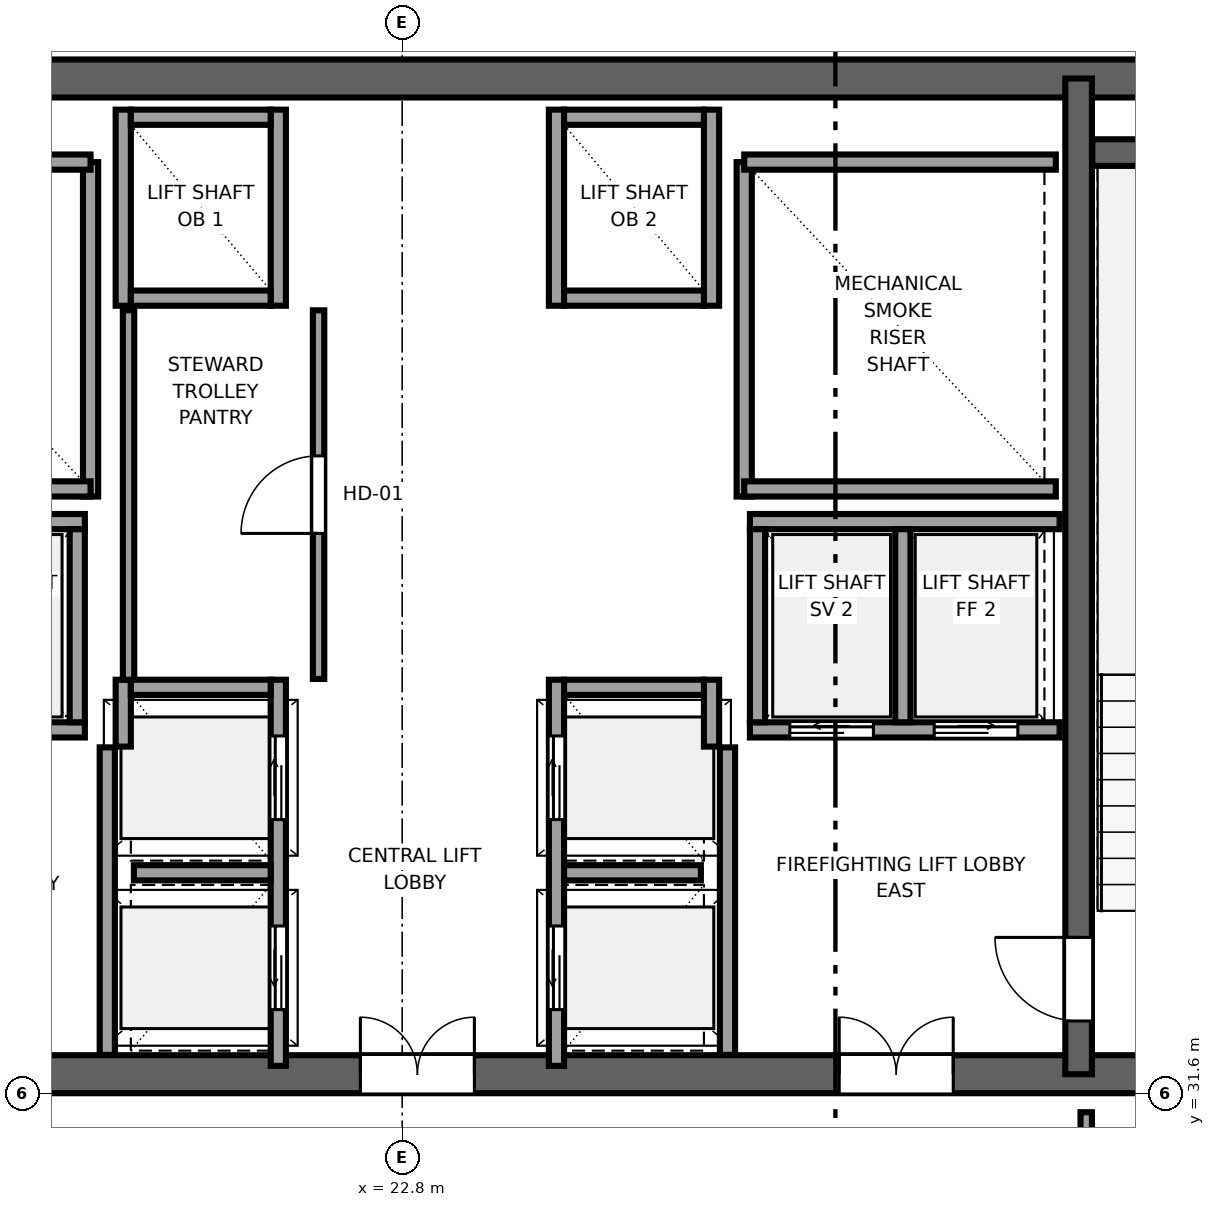
"""IFC4 building model, lengths in metres.
Left out: names, types, materials, properties, quantities, classifications, styles, units other than length and angle.
Written with IfcOpenShell. Run it as: python <this file> out.ifc"""

import sys

from ifc_helpers import new_model, si_unit, direction, frame, frame_2d, origin, place, context, subcontext, project, spatial, rectangle, extrude, source, transform, mapped, element, fill, save


model = new_model("IFC4")
c1 = context("Model", 3, precision=1e-05, world=origin(), true_north=direction((0.0, 1.0)))
c2 = subcontext(c1, "Body", "Model", "MODEL_VIEW")
j1 = project(units=[si_unit("LENGTHUNIT", "METRE"), si_unit("PLANEANGLEUNIT", "RADIAN")], contexts=[c1])
p1 = place(None, origin())
s1 = spatial("IfcSite", under=j1, at=p1, CompositionType="ELEMENT")
p2 = place(p1, origin())
s2 = spatial("IfcBuilding", under=s1, at=p2, CompositionType="ELEMENT")
p3 = place(p2, frame((0.0, 0.0, 275.05)))
s3 = spatial("IfcBuildingStorey", under=s2, at=p3, CompositionType="ELEMENT", Elevation=275.05)
p4 = place(p3, frame((10.0, 31.85, 0.0), z_axis=(0.0, 0.0, 1.0), x_axis=(1.0, 0.0, 0.0)))
e1 = element("IfcWall", 1, at=p4, inside=s3, PredefinedType="SHEAR", context=c2, shape_type="SweptSolid", body=[
    extrude(rectangle(XDim=26.0, YDim=0.5, at=frame_2d((13.0, 0.0))), origin(), (0.0, 0.0, 1.0), 3.55),
])
p5 = place(p4, frame((7.45, 0.0, 0.0), z_axis=(0.0, 0.0, 1.0), x_axis=(-1.0, 0.0, 0.0)))
e2 = element("IfcOpeningElement", 2, at=p5, cuts=e1, PredefinedType="OPENING", context=c2, shape_type="SweptSolid", body=[
    extrude(rectangle(XDim=1.5, YDim=2.04, at=frame_2d((0.75, 1.02))), frame((0.0, 0.26, 0.0), z_axis=(0.0, -1.0, 0.0), x_axis=(1.0, 0.0, 0.0)), (0.0, 0.0, 1.0), 0.52),
])
p6 = place(p4, frame((13.75, 0.0, 0.0), z_axis=(0.0, 0.0, 1.0), x_axis=(-1.0, 0.0, 0.0)))
e3 = element("IfcOpeningElement", 3, at=p6, cuts=e1, PredefinedType="OPENING", context=c2, shape_type="SweptSolid", body=[
    extrude(rectangle(XDim=1.5, YDim=2.04, at=frame_2d((0.75, 1.02))), frame((0.0, 0.26, 0.0), z_axis=(0.0, -1.0, 0.0), x_axis=(1.0, 0.0, 0.0)), (0.0, 0.0, 1.0), 0.52),
])
p7 = place(p4, frame((20.05, 0.0, 0.0), z_axis=(0.0, 0.0, 1.0), x_axis=(-1.0, 0.0, 0.0)))
e4 = element("IfcOpeningElement", 4, at=p7, cuts=e1, PredefinedType="OPENING", context=c2, shape_type="SweptSolid", body=[
    extrude(rectangle(XDim=1.5, YDim=2.04, at=frame_2d((0.75, 1.02))), frame((0.0, 0.26, 0.0), z_axis=(0.0, -1.0, 0.0), x_axis=(1.0, 0.0, 0.0)), (0.0, 0.0, 1.0), 0.52),
])
p8 = place(p3, frame((10.0, 44.95, 0.0), z_axis=(0.0, 0.0, 1.0), x_axis=(1.0, 0.0, 0.0)))
e5 = element("IfcWall", 5, at=p8, inside=s3, PredefinedType="SHEAR", context=c2, shape_type="SweptSolid", body=[
    extrude(rectangle(XDim=26.0, YDim=0.5, at=frame_2d((13.0, 0.0))), origin(), (0.0, 0.0, 1.0), 3.55),
])
p9 = place(p3, frame((31.7, 31.85, 0.0), z_axis=(0.0, 0.0, 1.0), x_axis=(0.0, 1.0, 0.0)))
e6 = element("IfcWall", 6, at=p9, inside=s3, PredefinedType="SHEAR", context=c2, shape_type="SweptSolid", body=[
    extrude(rectangle(XDim=13.1, YDim=0.35, at=frame_2d((6.55, 0.0))), origin(), (0.0, 0.0, 1.0), 3.55),
])
p10 = place(p9, frame((1.8, 0.0, 0.0), z_axis=(0.0, 0.0, 1.0), x_axis=(-1.0, 0.0, 0.0)))
e7 = element("IfcOpeningElement", 7, at=p10, cuts=e6, PredefinedType="OPENING", context=c2, shape_type="SweptSolid", body=[
    extrude(rectangle(XDim=1.1, YDim=2.12, at=frame_2d((0.55, 1.06))), frame((0.0, 0.185, 0.0), z_axis=(0.0, -1.0, 0.0), x_axis=(1.0, 0.0, 0.0)), (0.0, 0.0, 1.0), 0.37),
])
p11 = place(p3, frame((31.88, 43.975, 0.0), z_axis=(0.0, 0.0, 1.0), x_axis=(1.0, 0.0, 0.0)))
e8 = element("IfcWall", 8, at=p11, inside=s3, PredefinedType="SHEAR", context=c2, shape_type="SweptSolid", body=[
    extrude(rectangle(XDim=3.6, YDim=0.35, at=frame_2d((1.8, 0.0))), origin(), (0.0, 0.0, 1.0), 3.55),
])
p12 = place(p3, frame((18.7, 39.45, 0.0), z_axis=(0.0, 0.0, 1.0), x_axis=(0.0, 1.0, 0.0)))
e9 = element("IfcWall", 9, at=p12, inside=s3, PredefinedType="SOLIDWALL", context=c2, shape_type="SweptSolid", body=[
    extrude(rectangle(XDim=4.4, YDim=0.2, at=frame_2d((2.2, 0.0))), origin(), (0.0, 0.0, 1.0), 3.33),
])
for number, where, z_axis, x_axis in (
    (10, (14.6, 39.55, 0.0), (0.0, 0.0, 1.0), (1.0, 0.0, 0.0)),
    (11, (14.6, 43.85, 0.0), (0.0, 0.0, 1.0), (1.0, 0.0, 0.0)),
):
    element("IfcWall", number, at=place(p3, frame(where, z_axis=z_axis, x_axis=x_axis)), inside=s3, PredefinedType="SOLIDWALL", context=c2, shape_type="SweptSolid", body=[
        extrude(rectangle(XDim=4.1, YDim=0.2, at=frame_2d((2.05, 0.0))), origin(), (0.0, 0.0, 1.0), 3.33),
    ])
p13 = place(p3, frame((27.3, 39.45, 0.0), z_axis=(0.0, 0.0, 1.0), x_axis=(0.0, 1.0, 0.0)))
e12 = element("IfcWall", 12, at=p13, inside=s3, PredefinedType="SOLIDWALL", context=c2, shape_type="SweptSolid", body=[
    extrude(rectangle(XDim=4.4, YDim=0.2, at=frame_2d((2.2, 0.0))), origin(), (0.0, 0.0, 1.0), 3.33),
])
for number, where, z_axis, x_axis in (
    (13, (27.3, 39.55, 0.0), (0.0, 0.0, 1.0), (1.0, 0.0, 0.0)),
    (14, (27.3, 43.85, 0.0), (0.0, 0.0, 1.0), (1.0, 0.0, 0.0)),
):
    element("IfcWall", number, at=place(p3, frame(where, z_axis=z_axis, x_axis=x_axis)), inside=s3, PredefinedType="SOLIDWALL", context=c2, shape_type="SweptSolid", body=[
        extrude(rectangle(XDim=4.1, YDim=0.2, at=frame_2d((2.05, 0.0))), origin(), (0.0, 0.0, 1.0), 3.33),
    ])
for number, where, z_axis, x_axis in (
    (15, (18.92, 32.104, 0.0), (0.0, 0.0, 1.0), (0.0, 1.0, 0.0)),
    (16, (27.08, 32.104, 0.0), (0.0, 0.0, 1.0), (0.0, 1.0, 0.0)),
):
    element("IfcWall", number, at=place(p3, frame(where, z_axis=z_axis, x_axis=x_axis)), inside=s3, PredefinedType="SOLIDWALL", context=c2, shape_type="SweptSolid", body=[
        extrude(rectangle(XDim=4.046, YDim=0.2, at=frame_2d((2.023, 0.0))), origin(), (0.0, 0.0, 1.0), 3.33),
    ])
p14 = place(p3, frame((21.17, 31.96, 0.0), z_axis=(0.0, 0.0, 1.0), x_axis=(0.0, 1.0, 0.0)))
e17 = element("IfcWall", 17, at=p14, inside=s3, PredefinedType="SOLIDWALL", context=c2, shape_type="SweptSolid", body=[
    extrude(rectangle(XDim=5.08, YDim=0.2, at=frame_2d((2.54, 0.0))), origin(), (0.0, 0.0, 1.0), 3.33),
])
p15 = place(p14, frame((0.74, 0.0, 0.0)))
e18 = element("IfcOpeningElement", 18, at=p15, cuts=e17, PredefinedType="OPENING", context=c2, shape_type="SweptSolid", body=[
    extrude(rectangle(XDim=1.1, YDim=2.12, at=frame_2d((0.55, 1.06))), frame((0.0, 0.11, 0.0), z_axis=(0.0, -1.0, 0.0), x_axis=(1.0, 0.0, 0.0)), (0.0, 0.0, 1.0), 0.22),
])
p16 = place(p14, frame((3.24, 0.0, 0.0)))
e19 = element("IfcOpeningElement", 19, at=p16, cuts=e17, PredefinedType="OPENING", context=c2, shape_type="SweptSolid", body=[
    extrude(rectangle(XDim=1.1, YDim=2.12, at=frame_2d((0.55, 1.06))), frame((0.0, 0.11, 0.0), z_axis=(0.0, -1.0, 0.0), x_axis=(1.0, 0.0, 0.0)), (0.0, 0.0, 1.0), 0.22),
])
p17 = place(p3, frame((19.13, 36.16, 0.0), z_axis=(0.0, 0.0, 1.0), x_axis=(0.0, 1.0, 0.0)))
e20 = element("IfcWall", 20, at=p17, inside=s3, PredefinedType="SOLIDWALL", context=c2, shape_type="SweptSolid", body=[
    extrude(rectangle(XDim=0.88, YDim=0.2, at=frame_2d((0.44, 0.0))), origin(), (0.0, 0.0, 1.0), 3.33),
])
p18 = place(p3, frame((19.23, 36.94, 0.0), z_axis=(0.0, 0.0, 1.0), x_axis=(1.0, 0.0, 0.0)))
e21 = element("IfcWall", 21, at=p18, inside=s3, PredefinedType="SOLIDWALL", context=c2, shape_type="SweptSolid", body=[
    extrude(rectangle(XDim=1.84, YDim=0.2, at=frame_2d((0.92, 0.0))), origin(), (0.0, 0.0, 1.0), 3.33),
])
p19 = place(p3, frame((19.27, 34.5, 0.0), z_axis=(0.0, 0.0, 1.0), x_axis=(1.0, 0.0, 0.0)))
e22 = element("IfcWall", 22, at=p19, inside=s3, PredefinedType="SOLIDWALL", context=c2, shape_type="SweptSolid", body=[
    extrude(rectangle(XDim=1.8, YDim=0.2, at=frame_2d((0.9, 0.0))), origin(), (0.0, 0.0, 1.0), 3.33),
])
for number, where, z_axis, x_axis in (
    (23, (21.17, 41.96, 0.0), (0.0, 0.0, 1.0), (0.0, 1.0, 0.0)),
    (24, (19.13, 41.96, 0.0), (0.0, 0.0, 1.0), (0.0, 1.0, 0.0)),
):
    element("IfcWall", number, at=place(p3, frame(where, z_axis=z_axis, x_axis=x_axis)), inside=s3, PredefinedType="SOLIDWALL", context=c2, shape_type="SweptSolid", body=[
        extrude(rectangle(XDim=2.58, YDim=0.2, at=frame_2d((1.29, 0.0))), origin(), (0.0, 0.0, 1.0), 3.33),
    ])
for number, where, z_axis, x_axis in (
    (25, (19.23, 42.06, 0.0), (0.0, 0.0, 1.0), (1.0, 0.0, 0.0)),
    (26, (19.23, 44.44, 0.0), (0.0, 0.0, 1.0), (1.0, 0.0, 0.0)),
):
    element("IfcWall", number, at=place(p3, frame(where, z_axis=z_axis, x_axis=x_axis)), inside=s3, PredefinedType="SOLIDWALL", context=c2, shape_type="SweptSolid", body=[
        extrude(rectangle(XDim=1.84, YDim=0.2, at=frame_2d((0.92, 0.0))), origin(), (0.0, 0.0, 1.0), 3.33),
    ])
p20 = place(p3, frame((27.375, 36.38, 0.0), z_axis=(0.0, 0.0, 1.0), x_axis=(1.0, 0.0, 0.0)))
e27 = element("IfcWall", 27, at=p20, inside=s3, PredefinedType="SOLIDWALL", context=c2, shape_type="SweptSolid", body=[
    extrude(rectangle(XDim=4.075, YDim=0.2, at=frame_2d((2.038, 0.0))), origin(), (0.0, 0.0, 1.0), 3.33),
])
p21 = place(p20, frame((0.525, 0.0, 0.0)))
e28 = element("IfcOpeningElement", 28, at=p21, cuts=e27, PredefinedType="OPENING", context=c2, shape_type="SweptSolid", body=[
    extrude(rectangle(XDim=1.1, YDim=2.12, at=frame_2d((0.55, 1.06))), frame((0.0, 0.11, 0.0), z_axis=(0.0, -1.0, 0.0), x_axis=(1.0, 0.0, 0.0)), (0.0, 0.0, 1.0), 0.22),
])
p22 = place(p20, frame((2.425, 0.0, 0.0)))
e29 = element("IfcOpeningElement", 29, at=p22, cuts=e27, PredefinedType="OPENING", context=c2, shape_type="SweptSolid", body=[
    extrude(rectangle(XDim=1.1, YDim=2.12, at=frame_2d((0.55, 1.06))), frame((0.0, 0.11, 0.0), z_axis=(0.0, -1.0, 0.0), x_axis=(1.0, 0.0, 0.0)), (0.0, 0.0, 1.0), 0.22),
])
p23 = place(p3, frame((27.375, 39.12, 0.0), z_axis=(0.0, 0.0, 1.0), x_axis=(1.0, 0.0, 0.0)))
e30 = element("IfcWall", 30, at=p23, inside=s3, PredefinedType="SOLIDWALL", context=c2, shape_type="SweptSolid", body=[
    extrude(rectangle(XDim=4.075, YDim=0.2, at=frame_2d((2.038, 0.0))), origin(), (0.0, 0.0, 1.0), 3.33),
])
for number, where, z_axis, x_axis in (
    (31, (27.475, 36.48, 0.0), (0.0, 0.0, 1.0), (0.0, 1.0, 0.0)),
    (32, (29.387, 36.48, 0.0), (0.0, 0.0, 1.0), (0.0, 1.0, 0.0)),
):
    element("IfcWall", number, at=place(p3, frame(where, z_axis=z_axis, x_axis=x_axis)), inside=s3, PredefinedType="SOLIDWALL", context=c2, shape_type="SweptSolid", body=[
        extrude(rectangle(XDim=2.54, YDim=0.2, at=frame_2d((1.27, 0.0))), origin(), (0.0, 0.0, 1.0), 3.33),
    ])
p24 = place(p3, frame((14.55, 36.38, 0.0), z_axis=(0.0, 0.0, 1.0), x_axis=(1.0, 0.0, 0.0)))
e33 = element("IfcWall", 33, at=p24, inside=s3, PredefinedType="SOLIDWALL", context=c2, shape_type="SweptSolid", body=[
    extrude(rectangle(XDim=4.075, YDim=0.2, at=frame_2d((2.038, 0.0))), origin(), (0.0, 0.0, 1.0), 3.33),
])
p25 = place(p24, frame((0.55, 0.0, 0.0)))
e34 = element("IfcOpeningElement", 34, at=p25, cuts=e33, PredefinedType="OPENING", context=c2, shape_type="SweptSolid", body=[
    extrude(rectangle(XDim=1.1, YDim=2.12, at=frame_2d((0.55, 1.06))), frame((0.0, 0.11, 0.0), z_axis=(0.0, -1.0, 0.0), x_axis=(1.0, 0.0, 0.0)), (0.0, 0.0, 1.0), 0.22),
])
p26 = place(p24, frame((2.45, 0.0, 0.0)))
e35 = element("IfcOpeningElement", 35, at=p26, cuts=e33, PredefinedType="OPENING", context=c2, shape_type="SweptSolid", body=[
    extrude(rectangle(XDim=1.1, YDim=2.12, at=frame_2d((0.55, 1.06))), frame((0.0, 0.11, 0.0), z_axis=(0.0, -1.0, 0.0), x_axis=(1.0, 0.0, 0.0)), (0.0, 0.0, 1.0), 0.22),
])
p27 = place(p3, frame((14.55, 39.12, 0.0), z_axis=(0.0, 0.0, 1.0), x_axis=(1.0, 0.0, 0.0)))
e36 = element("IfcWall", 36, at=p27, inside=s3, PredefinedType="SOLIDWALL", context=c2, shape_type="SweptSolid", body=[
    extrude(rectangle(XDim=4.075, YDim=0.2, at=frame_2d((2.038, 0.0))), origin(), (0.0, 0.0, 1.0), 3.33),
])
p28 = place(p3, frame((18.525, 36.48, 0.0), z_axis=(0.0, 0.0, 1.0), x_axis=(0.0, 1.0, 0.0)))
e37 = element("IfcWall", 37, at=p28, inside=s3, PredefinedType="SOLIDWALL", context=c2, shape_type="SweptSolid", body=[
    extrude(rectangle(XDim=2.54, YDim=0.2, at=frame_2d((1.27, 0.0))), origin(), (0.0, 0.0, 1.0), 3.33),
])
p29 = place(p3, frame((24.83, 31.96, 0.0), z_axis=(0.0, 0.0, 1.0), x_axis=(0.0, 1.0, 0.0)))
e38 = element("IfcWall", 38, at=p29, inside=s3, PredefinedType="SOLIDWALL", context=c2, shape_type="SweptSolid", body=[
    extrude(rectangle(XDim=5.08, YDim=0.2, at=frame_2d((2.54, 0.0))), origin(), (0.0, 0.0, 1.0), 3.33),
])
p30 = place(p29, frame((0.74, 0.0, 0.0)))
e39 = element("IfcOpeningElement", 39, at=p30, cuts=e38, PredefinedType="OPENING", context=c2, shape_type="SweptSolid", body=[
    extrude(rectangle(XDim=1.1, YDim=2.12, at=frame_2d((0.55, 1.06))), frame((0.0, 0.11, 0.0), z_axis=(0.0, -1.0, 0.0), x_axis=(1.0, 0.0, 0.0)), (0.0, 0.0, 1.0), 0.22),
])
p31 = place(p29, frame((3.24, 0.0, 0.0)))
e40 = element("IfcOpeningElement", 40, at=p31, cuts=e38, PredefinedType="OPENING", context=c2, shape_type="SweptSolid", body=[
    extrude(rectangle(XDim=1.1, YDim=2.12, at=frame_2d((0.55, 1.06))), frame((0.0, 0.11, 0.0), z_axis=(0.0, -1.0, 0.0), x_axis=(1.0, 0.0, 0.0)), (0.0, 0.0, 1.0), 0.22),
])
p32 = place(p3, frame((26.87, 36.16, 0.0), z_axis=(0.0, 0.0, 1.0), x_axis=(0.0, 1.0, 0.0)))
e41 = element("IfcWall", 41, at=p32, inside=s3, PredefinedType="SOLIDWALL", context=c2, shape_type="SweptSolid", body=[
    extrude(rectangle(XDim=0.88, YDim=0.2, at=frame_2d((0.44, 0.0))), origin(), (0.0, 0.0, 1.0), 3.33),
])
p33 = place(p3, frame((24.93, 36.94, 0.0), z_axis=(0.0, 0.0, 1.0), x_axis=(1.0, 0.0, 0.0)))
e42 = element("IfcWall", 42, at=p33, inside=s3, PredefinedType="SOLIDWALL", context=c2, shape_type="SweptSolid", body=[
    extrude(rectangle(XDim=1.84, YDim=0.2, at=frame_2d((0.92, 0.0))), origin(), (0.0, 0.0, 1.0), 3.33),
])
p34 = place(p3, frame((24.93, 34.5, 0.0), z_axis=(0.0, 0.0, 1.0), x_axis=(1.0, 0.0, 0.0)))
e43 = element("IfcWall", 43, at=p34, inside=s3, PredefinedType="SOLIDWALL", context=c2, shape_type="SweptSolid", body=[
    extrude(rectangle(XDim=1.8, YDim=0.2, at=frame_2d((0.9, 0.0))), origin(), (0.0, 0.0, 1.0), 3.33),
])
for number, where, z_axis, x_axis in (
    (44, (24.83, 41.96, 0.0), (0.0, 0.0, 1.0), (0.0, 1.0, 0.0)),
    (45, (26.87, 41.96, 0.0), (0.0, 0.0, 1.0), (0.0, 1.0, 0.0)),
):
    element("IfcWall", number, at=place(p3, frame(where, z_axis=z_axis, x_axis=x_axis)), inside=s3, PredefinedType="SOLIDWALL", context=c2, shape_type="SweptSolid", body=[
        extrude(rectangle(XDim=2.58, YDim=0.2, at=frame_2d((1.29, 0.0))), origin(), (0.0, 0.0, 1.0), 3.33),
    ])
for number, where, z_axis, x_axis in (
    (46, (24.93, 42.06, 0.0), (0.0, 0.0, 1.0), (1.0, 0.0, 0.0)),
    (47, (24.93, 44.44, 0.0), (0.0, 0.0, 1.0), (1.0, 0.0, 0.0)),
):
    element("IfcWall", number, at=place(p3, frame(where, z_axis=z_axis, x_axis=x_axis)), inside=s3, PredefinedType="SOLIDWALL", context=c2, shape_type="SweptSolid", body=[
        extrude(rectangle(XDim=1.84, YDim=0.2, at=frame_2d((0.92, 0.0))), origin(), (0.0, 0.0, 1.0), 3.33),
    ])
p35 = place(p3, frame((21.7, 37.05, 0.0), z_axis=(0.0, 0.0, 1.0), x_axis=(0.0, 1.0, 0.0)))
e48 = element("IfcWall", 48, at=p35, inside=s3, PredefinedType="PARTITIONING", context=c2, shape_type="SweptSolid", body=[
    extrude(rectangle(XDim=4.85, YDim=0.15, at=frame_2d((2.425, 0.0))), origin(), (0.0, 0.0, 1.0), 3.33),
])
p36 = place(p35, frame((1.915, 0.0, 0.0)))
e49 = element("IfcOpeningElement", 49, at=p36, cuts=e48, PredefinedType="OPENING", context=c2, shape_type="SweptSolid", body=[
    extrude(rectangle(XDim=1.02, YDim=2.03, at=frame_2d((0.51, 1.015))), frame((0.0, 0.085, 0.0), z_axis=(0.0, -1.0, 0.0), x_axis=(1.0, 0.0, 0.0)), (0.0, 0.0, 1.0), 0.17),
])
p37 = place(p3, frame((19.2, 37.04, 0.0), z_axis=(0.0, 0.0, 1.0), x_axis=(0.0, 1.0, 0.0)))
e50 = element("IfcWall", 50, at=p37, inside=s3, PredefinedType="PARTITIONING", context=c2, shape_type="SweptSolid", body=[
    extrude(rectangle(XDim=4.86, YDim=0.15, at=frame_2d((2.43, 0.0))), origin(), (0.0, 0.0, 1.0), 3.33),
])
p38 = place(p3, frame((31.8, 24.8, 0.0), z_axis=(0.0, 0.0, 1.0), x_axis=(0.0, 1.0, 0.0)))
e51 = element("IfcWall", 51, at=p38, inside=s3, PredefinedType="PARTITIONING", context=c2, shape_type="SweptSolid", body=[
    extrude(rectangle(XDim=6.55, YDim=0.15, at=frame_2d((3.275, 0.0))), origin(), (0.0, 0.0, 1.0), 3.33),
])
p39 = place(p38, frame((2.765, 0.0, 0.0)))
e52 = element("IfcOpeningElement", 52, at=p39, cuts=e51, PredefinedType="OPENING", context=c2, shape_type="SweptSolid", body=[
    extrude(rectangle(XDim=1.02, YDim=2.03, at=frame_2d((0.51, 1.015))), frame((0.0, 0.085, 0.0), z_axis=(0.0, -1.0, 0.0), x_axis=(1.0, 0.0, 0.0)), (0.0, 0.0, 1.0), 0.17),
])
m1 = source(origin(), c2, "Body", "SweptSolid", [
    extrude(rectangle(XDim=1.1, YDim=2.12, at=frame_2d((0.55, 1.06))), frame((0.0, 0.025, 0.0), z_axis=(0.0, -1.0, 0.0), x_axis=(1.0, 0.0, 0.0)), (0.0, 0.0, 1.0), 0.05),
])
p40 = place(p10, origin())
e53 = element("IfcDoor", 53, at=p40, inside=s3, OperationType="SINGLE_SWING_RIGHT", PredefinedType="DOOR", context=c2, shape_type="MappedRepresentation", body=[
    mapped(m1, transform((0.0, 0.0, 0.0), x_axis=(1.0, 0.0, 0.0), y_axis=(0.0, 1.0, 0.0), z_axis=(0.0, 0.0, 1.0), scale=1.0)),
])
fill(e7, e53)
m2 = source(origin(), c2, "Body", "SweptSolid", [
    extrude(rectangle(XDim=1.5, YDim=2.04, at=frame_2d((0.75, 1.02))), frame((0.0, 0.025, 0.0), z_axis=(0.0, -1.0, 0.0), x_axis=(1.0, 0.0, 0.0)), (0.0, 0.0, 1.0), 0.05),
])
p41 = place(p6, origin())
e54 = element("IfcDoor", 54, at=p41, inside=s3, OperationType="DOUBLE_DOOR_SINGLE_SWING", PredefinedType="DOOR", context=c2, shape_type="MappedRepresentation", body=[
    mapped(m2, transform((0.0, 0.0, 0.0), x_axis=(1.0, 0.0, 0.0), y_axis=(0.0, 1.0, 0.0), z_axis=(0.0, 0.0, 1.0), scale=1.0)),
])
fill(e3, e54)
p42 = place(p7, origin())
e55 = element("IfcDoor", 55, at=p42, inside=s3, OperationType="DOUBLE_DOOR_SINGLE_SWING", PredefinedType="DOOR", context=c2, shape_type="MappedRepresentation", body=[
    mapped(m2, transform((0.0, 0.0, 0.0), x_axis=(1.0, 0.0, 0.0), y_axis=(0.0, 1.0, 0.0), z_axis=(0.0, 0.0, 1.0), scale=1.0)),
])
fill(e4, e55)
m3 = source(origin(), c2, "Body", "SweptSolid", [
    extrude(rectangle(XDim=1.1, YDim=2.12, at=frame_2d((0.55, 1.06))), frame((0.0, 0.025, 0.0), z_axis=(0.0, -1.0, 0.0), x_axis=(1.0, 0.0, 0.0)), (0.0, 0.0, 1.0), 0.05),
])
p43 = place(p15, origin())
e56 = element("IfcDoor", 56, at=p43, inside=s3, OperationType="SLIDING_TO_LEFT", PredefinedType="DOOR", context=c2, shape_type="MappedRepresentation", body=[
    mapped(m3, transform((0.0, 0.0, 0.0), x_axis=(1.0, 0.0, 0.0), y_axis=(0.0, 1.0, 0.0), z_axis=(0.0, 0.0, 1.0), scale=1.0)),
])
fill(e18, e56)
p44 = place(p16, origin())
e57 = element("IfcDoor", 57, at=p44, inside=s3, OperationType="SLIDING_TO_RIGHT", PredefinedType="DOOR", context=c2, shape_type="MappedRepresentation", body=[
    mapped(m3, transform((0.0, 0.0, 0.0), x_axis=(1.0, 0.0, 0.0), y_axis=(0.0, 1.0, 0.0), z_axis=(0.0, 0.0, 1.0), scale=1.0)),
])
fill(e19, e57)
p45 = place(p21, origin())
e58 = element("IfcDoor", 58, at=p45, inside=s3, OperationType="SLIDING_TO_LEFT", PredefinedType="DOOR", context=c2, shape_type="MappedRepresentation", body=[
    mapped(m3, transform((0.0, 0.0, 0.0), x_axis=(1.0, 0.0, 0.0), y_axis=(0.0, 1.0, 0.0), z_axis=(0.0, 0.0, 1.0), scale=1.0)),
])
fill(e28, e58)
p46 = place(p22, origin())
e59 = element("IfcDoor", 59, at=p46, inside=s3, OperationType="SLIDING_TO_RIGHT", PredefinedType="DOOR", context=c2, shape_type="MappedRepresentation", body=[
    mapped(m3, transform((0.0, 0.0, 0.0), x_axis=(1.0, 0.0, 0.0), y_axis=(0.0, 1.0, 0.0), z_axis=(0.0, 0.0, 1.0), scale=1.0)),
])
fill(e29, e59)
p47 = place(p30, origin())
e60 = element("IfcDoor", 60, at=p47, inside=s3, OperationType="SLIDING_TO_LEFT", PredefinedType="DOOR", context=c2, shape_type="MappedRepresentation", body=[
    mapped(m3, transform((0.0, 0.0, 0.0), x_axis=(1.0, 0.0, 0.0), y_axis=(0.0, 1.0, 0.0), z_axis=(0.0, 0.0, 1.0), scale=1.0)),
])
fill(e39, e60)
p48 = place(p31, origin())
e61 = element("IfcDoor", 61, at=p48, inside=s3, OperationType="SLIDING_TO_RIGHT", PredefinedType="DOOR", context=c2, shape_type="MappedRepresentation", body=[
    mapped(m3, transform((0.0, 0.0, 0.0), x_axis=(1.0, 0.0, 0.0), y_axis=(0.0, 1.0, 0.0), z_axis=(0.0, 0.0, 1.0), scale=1.0)),
])
fill(e40, e61)
m4 = source(origin(), c2, "Body", "SweptSolid", [
    extrude(rectangle(XDim=1.02, YDim=2.03, at=frame_2d((0.51, 1.015))), frame((0.0, 0.025, 0.0), z_axis=(0.0, -1.0, 0.0), x_axis=(1.0, 0.0, 0.0)), (0.0, 0.0, 1.0), 0.05),
])
p49 = place(p36, origin())
e62 = element("IfcDoor", 62, at=p49, inside=s3, OperationType="SINGLE_SWING_LEFT", PredefinedType="DOOR", context=c2, shape_type="MappedRepresentation", body=[
    mapped(m4, transform((0.0, 0.0, 0.0), x_axis=(1.0, 0.0, 0.0), y_axis=(0.0, 1.0, 0.0), z_axis=(0.0, 0.0, 1.0), scale=1.0)),
])
fill(e49, e62)
save(model, sys.argv[1])
